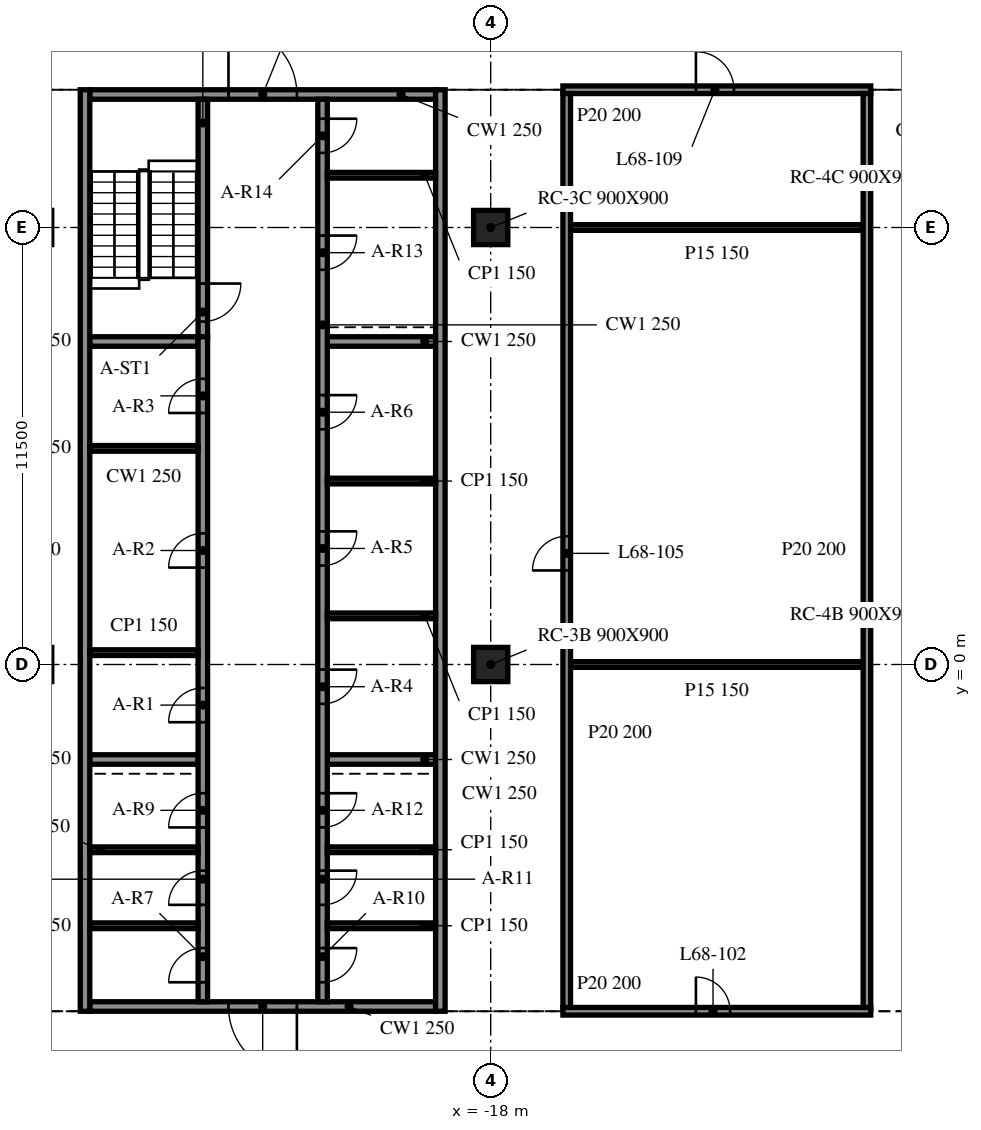
"""IFC4 building model, lengths in metres.
Left out: names, types, materials, properties, quantities, classifications, styles, units other than length and angle.
Written with IfcOpenShell. Run it as: python <this file> out.ifc"""

import sys

from ifc_helpers import new_model, si_unit, direction, frame, frame_2d, origin, origin_2d, place, context, subcontext, project, spatial, rectangle, extrude, element, fill, save


model = new_model("IFC4")
c1 = context("Model", 3, precision=1e-05, world=origin(), true_north=direction((0.0, 1.0)))
c2 = subcontext(c1, "Body", "Model", "MODEL_VIEW")
j1 = project(units=[si_unit("LENGTHUNIT", "METRE"), si_unit("PLANEANGLEUNIT", "RADIAN")], contexts=[c1])
p1 = place(None, origin())
s1 = spatial("IfcSite", under=j1, at=p1, CompositionType="ELEMENT")
p2 = place(p1, origin())
s2 = spatial("IfcBuilding", under=s1, at=p2, CompositionType="ELEMENT")
p3 = place(p2, frame((0.0, 0.0, 278.5)))
s3 = spatial("IfcBuildingStorey", under=s2, at=p3, CompositionType="ELEMENT", Elevation=278.5)
for number, where, z_axis, x_axis in (
    (1, (-18.0, 0.0, -0.34), (0.0, 0.0, 1.0), (1.0, 0.0, 0.0)),
    (2, (-18.0, 11.5, -0.34), (0.0, 0.0, 1.0), (1.0, 0.0, 0.0)),
):
    element("IfcColumn", number, at=place(p3, frame(where, z_axis=z_axis, x_axis=x_axis)), inside=s3, PredefinedType="COLUMN", context=c2, shape_type="SweptSolid", body=[
        extrude(rectangle(XDim=0.9, YDim=0.9, at=origin_2d()), origin(), (0.0, 0.0, 1.0), 3.8),
    ])
for number, where, z_axis, x_axis in (
    (3, (-28.675, 15.125, 0.0), (0.0, 0.0, 1.0), (0.0, -1.0, 0.0)),
    (4, (-19.325, -9.125, 0.0), (0.0, 0.0, 1.0), (0.0, 1.0, 0.0)),
):
    element("IfcWall", number, at=place(p3, frame(where, z_axis=z_axis, x_axis=x_axis)), inside=s3, PredefinedType="SOLIDWALL", context=c2, shape_type="SweptSolid", body=[
        extrude(rectangle(XDim=24.25, YDim=0.25, at=frame_2d((12.125, 0.0))), origin(), (0.0, 0.0, 1.0), 3.46),
    ])
p4 = place(p3, frame((-19.45, -9.0, 0.0), z_axis=(0.0, 0.0, 1.0), x_axis=(-1.0, 0.0, 0.0)))
e5 = element("IfcWall", 5, at=p4, inside=s3, PredefinedType="SOLIDWALL", context=c2, shape_type="SweptSolid", body=[
    extrude(rectangle(XDim=9.1, YDim=0.25, at=frame_2d((4.55, 0.0))), origin(), (0.0, 0.0, 1.0), 3.46),
])
p5 = place(p4, frame((3.65, 0.0, 0.0)))
e6 = element("IfcOpeningElement", 6, at=p5, cuts=e5, PredefinedType="OPENING", context=c2, shape_type="SweptSolid", body=[
    extrude(rectangle(XDim=1.8, YDim=2.1, at=frame_2d((0.9, 1.05))), frame((0.0, 0.135, 0.0), z_axis=(0.0, -1.0, 0.0), x_axis=(1.0, 0.0, 0.0)), (0.0, 0.0, 1.0), 0.27),
])
p6 = place(p3, frame((-28.55, 15.0, 0.0), z_axis=(0.0, 0.0, 1.0), x_axis=(1.0, 0.0, 0.0)))
e7 = element("IfcWall", 7, at=p6, inside=s3, PredefinedType="SOLIDWALL", context=c2, shape_type="SweptSolid", body=[
    extrude(rectangle(XDim=9.1, YDim=0.25, at=frame_2d((4.55, 0.0))), origin(), (0.0, 0.0, 1.0), 3.46),
])
p7 = place(p6, frame((3.65, 0.0, 0.0)))
e8 = element("IfcOpeningElement", 8, at=p7, cuts=e7, PredefinedType="OPENING", context=c2, shape_type="SweptSolid", body=[
    extrude(rectangle(XDim=1.8, YDim=2.1, at=frame_2d((0.9, 1.05))), frame((0.0, 0.135, 0.0), z_axis=(0.0, -1.0, 0.0), x_axis=(1.0, 0.0, 0.0)), (0.0, 0.0, 1.0), 0.27),
])
p8 = place(p3, frame((-25.575, -8.875, 0.0), z_axis=(0.0, 0.0, 1.0), x_axis=(0.0, 1.0, 0.0)))
e9 = element("IfcWall", 9, at=p8, inside=s3, PredefinedType="SOLIDWALL", context=c2, shape_type="SweptSolid", body=[
    extrude(rectangle(XDim=17.5, YDim=0.25, at=frame_2d((8.75, 0.0))), origin(), (0.0, 0.0, 1.0), 3.46),
])
p9 = place(p8, frame((7.356, 0.0, 0.0)))
e10 = element("IfcOpeningElement", 10, at=p9, cuts=e9, PredefinedType="OPENING", context=c2, shape_type="SweptSolid", body=[
    extrude(rectangle(XDim=0.9, YDim=2.1, at=frame_2d((0.45, 1.05))), frame((0.0, 0.135, 0.0), z_axis=(0.0, -1.0, 0.0), x_axis=(1.0, 0.0, 0.0)), (0.0, 0.0, 1.0), 0.27),
])
p10 = place(p8, frame((11.425, 0.0, 0.0)))
e11 = element("IfcOpeningElement", 11, at=p10, cuts=e9, PredefinedType="OPENING", context=c2, shape_type="SweptSolid", body=[
    extrude(rectangle(XDim=0.9, YDim=2.1, at=frame_2d((0.45, 1.05))), frame((0.0, 0.135, 0.0), z_axis=(0.0, -1.0, 0.0), x_axis=(1.0, 0.0, 0.0)), (0.0, 0.0, 1.0), 0.27),
])
p11 = place(p8, frame((15.494, 0.0, 0.0)))
e12 = element("IfcOpeningElement", 12, at=p11, cuts=e9, PredefinedType="OPENING", context=c2, shape_type="SweptSolid", body=[
    extrude(rectangle(XDim=0.9, YDim=2.1, at=frame_2d((0.45, 1.05))), frame((0.0, 0.135, 0.0), z_axis=(0.0, -1.0, 0.0), x_axis=(1.0, 0.0, 0.0)), (0.0, 0.0, 1.0), 0.27),
])
p12 = place(p8, frame((0.512, 0.0, 0.0)))
e13 = element("IfcOpeningElement", 13, at=p12, cuts=e9, PredefinedType="OPENING", context=c2, shape_type="SweptSolid", body=[
    extrude(rectangle(XDim=0.9, YDim=2.1, at=frame_2d((0.45, 1.05))), frame((0.0, 0.135, 0.0), z_axis=(0.0, -1.0, 0.0), x_axis=(1.0, 0.0, 0.0)), (0.0, 0.0, 1.0), 0.27),
])
p13 = place(p8, frame((2.55, 0.0, 0.0)))
e14 = element("IfcOpeningElement", 14, at=p13, cuts=e9, PredefinedType="OPENING", context=c2, shape_type="SweptSolid", body=[
    extrude(rectangle(XDim=0.9, YDim=2.1, at=frame_2d((0.45, 1.05))), frame((0.0, 0.135, 0.0), z_axis=(0.0, -1.0, 0.0), x_axis=(1.0, 0.0, 0.0)), (0.0, 0.0, 1.0), 0.27),
])
p14 = place(p8, frame((4.587, 0.0, 0.0)))
e15 = element("IfcOpeningElement", 15, at=p14, cuts=e9, PredefinedType="OPENING", context=c2, shape_type="SweptSolid", body=[
    extrude(rectangle(XDim=0.9, YDim=2.1, at=frame_2d((0.45, 1.05))), frame((0.0, 0.135, 0.0), z_axis=(0.0, -1.0, 0.0), x_axis=(1.0, 0.0, 0.0)), (0.0, 0.0, 1.0), 0.27),
])
p15 = place(p3, frame((-25.575, 14.875, 0.0), z_axis=(0.0, 0.0, 1.0), x_axis=(0.0, -1.0, 0.0)))
e16 = element("IfcWall", 16, at=p15, inside=s3, PredefinedType="SOLIDWALL", context=c2, shape_type="SweptSolid", body=[
    extrude(rectangle(XDim=6.25, YDim=0.25, at=frame_2d((3.125, 0.0))), origin(), (0.0, 0.0, 1.0), 3.46),
])
p16 = place(p15, frame((4.85, 0.0, 0.0)))
e17 = element("IfcOpeningElement", 17, at=p16, cuts=e16, PredefinedType="OPENING", context=c2, shape_type="SweptSolid", body=[
    extrude(rectangle(XDim=1.0, YDim=2.1, at=frame_2d((0.5, 1.05))), frame((0.0, 0.135, 0.0), z_axis=(0.0, -1.0, 0.0), x_axis=(1.0, 0.0, 0.0)), (0.0, 0.0, 1.0), 0.27),
])
p17 = place(p3, frame((-22.425, 14.875, 0.0), z_axis=(0.0, 0.0, 1.0), x_axis=(0.0, -1.0, 0.0)))
e18 = element("IfcWall", 18, at=p17, inside=s3, PredefinedType="SOLIDWALL", context=c2, shape_type="SweptSolid", body=[
    extrude(rectangle(XDim=23.75, YDim=0.25, at=frame_2d((11.875, 0.0))), origin(), (0.0, 0.0, 1.0), 3.46),
])
p18 = place(p17, frame((15.01, 0.0, 0.0)))
e19 = element("IfcOpeningElement", 19, at=p18, cuts=e18, PredefinedType="OPENING", context=c2, shape_type="SweptSolid", body=[
    extrude(rectangle(XDim=0.9, YDim=2.1, at=frame_2d((0.45, 1.05))), frame((0.0, 0.135, 0.0), z_axis=(0.0, -1.0, 0.0), x_axis=(1.0, 0.0, 0.0)), (0.0, 0.0, 1.0), 0.27),
])
p19 = place(p17, frame((11.371, 0.0, 0.0)))
e20 = element("IfcOpeningElement", 20, at=p19, cuts=e18, PredefinedType="OPENING", context=c2, shape_type="SweptSolid", body=[
    extrude(rectangle(XDim=0.9, YDim=2.1, at=frame_2d((0.45, 1.05))), frame((0.0, 0.135, 0.0), z_axis=(0.0, -1.0, 0.0), x_axis=(1.0, 0.0, 0.0)), (0.0, 0.0, 1.0), 0.27),
])
p20 = place(p17, frame((7.786, 0.0, 0.0)))
e21 = element("IfcOpeningElement", 21, at=p20, cuts=e18, PredefinedType="OPENING", context=c2, shape_type="SweptSolid", body=[
    extrude(rectangle(XDim=0.9, YDim=2.1, at=frame_2d((0.45, 1.05))), frame((0.0, 0.135, 0.0), z_axis=(0.0, -1.0, 0.0), x_axis=(1.0, 0.0, 0.0)), (0.0, 0.0, 1.0), 0.27),
])
p21 = place(p17, frame((22.337, 0.0, 0.0)))
e22 = element("IfcOpeningElement", 22, at=p21, cuts=e18, PredefinedType="OPENING", context=c2, shape_type="SweptSolid", body=[
    extrude(rectangle(XDim=0.9, YDim=2.1, at=frame_2d((0.45, 1.05))), frame((0.0, 0.135, 0.0), z_axis=(0.0, -1.0, 0.0), x_axis=(1.0, 0.0, 0.0)), (0.0, 0.0, 1.0), 0.27),
])
p22 = place(p17, frame((20.3, 0.0, 0.0)))
e23 = element("IfcOpeningElement", 23, at=p22, cuts=e18, PredefinedType="OPENING", context=c2, shape_type="SweptSolid", body=[
    extrude(rectangle(XDim=0.9, YDim=2.1, at=frame_2d((0.45, 1.05))), frame((0.0, 0.135, 0.0), z_axis=(0.0, -1.0, 0.0), x_axis=(1.0, 0.0, 0.0)), (0.0, 0.0, 1.0), 0.27),
])
p23 = place(p17, frame((18.262, 0.0, 0.0)))
e24 = element("IfcOpeningElement", 24, at=p23, cuts=e18, PredefinedType="OPENING", context=c2, shape_type="SweptSolid", body=[
    extrude(rectangle(XDim=0.9, YDim=2.1, at=frame_2d((0.45, 1.05))), frame((0.0, 0.135, 0.0), z_axis=(0.0, -1.0, 0.0), x_axis=(1.0, 0.0, 0.0)), (0.0, 0.0, 1.0), 0.27),
])
p24 = place(p17, frame((3.587, 0.0, 0.0)))
e25 = element("IfcOpeningElement", 25, at=p24, cuts=e18, PredefinedType="OPENING", context=c2, shape_type="SweptSolid", body=[
    extrude(rectangle(XDim=0.9, YDim=2.1, at=frame_2d((0.45, 1.05))), frame((0.0, 0.135, 0.0), z_axis=(0.0, -1.0, 0.0), x_axis=(1.0, 0.0, 0.0)), (0.0, 0.0, 1.0), 0.27),
])
p25 = place(p17, frame((0.512, 0.0, 0.0)))
e26 = element("IfcOpeningElement", 26, at=p25, cuts=e18, PredefinedType="OPENING", context=c2, shape_type="SweptSolid", body=[
    extrude(rectangle(XDim=0.9, YDim=2.1, at=frame_2d((0.45, 1.05))), frame((0.0, 0.135, 0.0), z_axis=(0.0, -1.0, 0.0), x_axis=(1.0, 0.0, 0.0)), (0.0, 0.0, 1.0), 0.27),
])
for number, where, z_axis, x_axis in (
    (27, (-28.55, -2.5, 0.0), (0.0, 0.0, 1.0), (1.0, 0.0, 0.0)),
    (28, (-28.55, 8.5, 0.0), (0.0, 0.0, 1.0), (1.0, 0.0, 0.0)),
    (29, (-22.3, -2.5, 0.0), (0.0, 0.0, 1.0), (1.0, 0.0, 0.0)),
    (30, (-22.3, 8.5, 0.0), (0.0, 0.0, 1.0), (1.0, 0.0, 0.0)),
):
    element("IfcWall", number, at=place(p3, frame(where, z_axis=z_axis, x_axis=x_axis)), inside=s3, PredefinedType="SOLIDWALL", context=c2, shape_type="SweptSolid", body=[
        extrude(rectangle(XDim=2.85, YDim=0.25, at=frame_2d((1.425, 0.0))), origin(), (0.0, 0.0, 1.0), 3.46),
    ])
for number, where, z_axis, x_axis in (
    (31, (-28.55, 0.312, 0.0), (0.0, 0.0, 1.0), (1.0, 0.0, 0.0)),
    (32, (-28.55, 5.688, 0.0), (0.0, 0.0, 1.0), (1.0, 0.0, 0.0)),
    (33, (-22.3, 1.28, 0.0), (0.0, 0.0, 1.0), (1.0, 0.0, 0.0)),
    (34, (-22.3, 4.827, 0.0), (0.0, 0.0, 1.0), (1.0, 0.0, 0.0)),
    (35, (-28.55, -6.875, 0.0), (0.0, 0.0, 1.0), (1.0, 0.0, 0.0)),
    (36, (-28.55, -4.875, 0.0), (0.0, 0.0, 1.0), (1.0, 0.0, 0.0)),
    (37, (-22.3, -6.875, 0.0), (0.0, 0.0, 1.0), (1.0, 0.0, 0.0)),
    (38, (-22.3, -4.875, 0.0), (0.0, 0.0, 1.0), (1.0, 0.0, 0.0)),
    (39, (-22.3, 12.875, 0.0), (0.0, 0.0, 1.0), (1.0, 0.0, 0.0)),
):
    element("IfcWall", number, at=place(p3, frame(where, z_axis=z_axis, x_axis=x_axis)), inside=s3, PredefinedType="PARTITIONING", context=c2, shape_type="SweptSolid", body=[
        extrude(rectangle(XDim=2.85, YDim=0.15, at=frame_2d((1.425, 0.0))), origin(), (0.0, 0.0, 1.0), 3.46),
    ])
p26 = place(p3, frame((-16.1, -9.125, 0.0), z_axis=(0.0, 0.0, 1.0), x_axis=(1.0, 0.0, 0.0)))
e40 = element("IfcWall", 40, at=p26, inside=s3, PredefinedType="PARTITIONING", context=c2, shape_type="SweptSolid", body=[
    extrude(rectangle(XDim=8.1, YDim=0.2, at=frame_2d((4.05, 0.0))), origin(), (0.0, 0.0, 1.0), 3.46),
])
p27 = place(p26, frame((3.5, 0.0, 0.0)))
e41 = element("IfcOpeningElement", 41, at=p27, cuts=e40, PredefinedType="OPENING", context=c2, shape_type="SweptSolid", body=[
    extrude(rectangle(XDim=0.9, YDim=2.1, at=frame_2d((0.45, 1.05))), frame((0.0, 0.11, 0.0), z_axis=(0.0, -1.0, 0.0), x_axis=(1.0, 0.0, 0.0)), (0.0, 0.0, 1.0), 0.22),
])
for number, where, z_axis, x_axis in (
    (42, (-15.9, 0.0, 0.0), (0.0, 0.0, 1.0), (1.0, 0.0, 0.0)),
    (43, (-15.9, 11.5, 0.0), (0.0, 0.0, 1.0), (1.0, 0.0, 0.0)),
):
    element("IfcWall", number, at=place(p3, frame(where, z_axis=z_axis, x_axis=x_axis)), inside=s3, PredefinedType="PARTITIONING", context=c2, shape_type="SweptSolid", body=[
        extrude(rectangle(XDim=7.7, YDim=0.15, at=frame_2d((3.85, 0.0))), origin(), (0.0, 0.0, 1.0), 3.46),
    ])
p28 = place(p3, frame((-16.1, 15.125, 0.0), z_axis=(0.0, 0.0, 1.0), x_axis=(1.0, 0.0, 0.0)))
e44 = element("IfcWall", 44, at=p28, inside=s3, PredefinedType="PARTITIONING", context=c2, shape_type="SweptSolid", body=[
    extrude(rectangle(XDim=8.1, YDim=0.2, at=frame_2d((4.05, 0.0))), origin(), (0.0, 0.0, 1.0), 3.46),
])
p29 = place(p28, frame((3.5, 0.0, 0.0)))
e45 = element("IfcOpeningElement", 45, at=p29, cuts=e44, PredefinedType="OPENING", context=c2, shape_type="SweptSolid", body=[
    extrude(rectangle(XDim=1.0, YDim=2.1, at=frame_2d((0.5, 1.05))), frame((0.0, 0.11, 0.0), z_axis=(0.0, -1.0, 0.0), x_axis=(1.0, 0.0, 0.0)), (0.0, 0.0, 1.0), 0.22),
])
p30 = place(p3, frame((-16.0, -9.025, 0.0), z_axis=(0.0, 0.0, 1.0), x_axis=(0.0, 1.0, 0.0)))
e46 = element("IfcWall", 46, at=p30, inside=s3, PredefinedType="PARTITIONING", context=c2, shape_type="SweptSolid", body=[
    extrude(rectangle(XDim=24.05, YDim=0.2, at=frame_2d((12.025, 0.0))), origin(), (0.0, 0.0, 1.0), 3.46),
])
p31 = place(p30, frame((11.5, 0.0, 0.0)))
e47 = element("IfcOpeningElement", 47, at=p31, cuts=e46, PredefinedType="OPENING", context=c2, shape_type="SweptSolid", body=[
    extrude(rectangle(XDim=0.9, YDim=2.1, at=frame_2d((0.45, 1.05))), frame((0.0, 0.11, 0.0), z_axis=(0.0, -1.0, 0.0), x_axis=(1.0, 0.0, 0.0)), (0.0, 0.0, 1.0), 0.22),
])
p32 = place(p3, frame((-8.1, -9.025, 0.0), z_axis=(0.0, 0.0, 1.0), x_axis=(0.0, 1.0, 0.0)))
e48 = element("IfcWall", 48, at=p32, inside=s3, PredefinedType="PARTITIONING", context=c2, shape_type="SweptSolid", body=[
    extrude(rectangle(XDim=24.05, YDim=0.2, at=frame_2d((12.025, 0.0))), origin(), (0.0, 0.0, 1.0), 3.46),
])
p33 = place(p5, origin())
e49 = element("IfcDoor", 49, at=p33, inside=s3, OperationType="DOUBLE_DOOR_SINGLE_SWING", PredefinedType="DOOR", context=c2, shape_type="SweptSolid", body=[
    extrude(rectangle(XDim=1.8, YDim=2.1, at=frame_2d((0.9, 1.05))), frame((0.0, 0.025, 0.0), z_axis=(0.0, -1.0, 0.0), x_axis=(1.0, 0.0, 0.0)), (0.0, 0.0, 1.0), 0.05),
])
fill(e6, e49)
p34 = place(p7, origin())
e50 = element("IfcDoor", 50, at=p34, inside=s3, OperationType="DOUBLE_DOOR_SINGLE_SWING", PredefinedType="DOOR", context=c2, shape_type="SweptSolid", body=[
    extrude(rectangle(XDim=1.8, YDim=2.1, at=frame_2d((0.9, 1.05))), frame((0.0, 0.025, 0.0), z_axis=(0.0, -1.0, 0.0), x_axis=(1.0, 0.0, 0.0)), (0.0, 0.0, 1.0), 0.05),
])
fill(e8, e50)
p35 = place(p9, origin())
e51 = element("IfcDoor", 51, at=p35, inside=s3, OperationType="SINGLE_SWING_LEFT", PredefinedType="DOOR", context=c2, shape_type="SweptSolid", body=[
    extrude(rectangle(XDim=0.9, YDim=2.1, at=frame_2d((0.45, 1.05))), frame((0.0, 0.025, 0.0), z_axis=(0.0, -1.0, 0.0), x_axis=(1.0, 0.0, 0.0)), (0.0, 0.0, 1.0), 0.05),
])
fill(e10, e51)
p36 = place(p10, origin())
e52 = element("IfcDoor", 52, at=p36, inside=s3, OperationType="SINGLE_SWING_RIGHT", PredefinedType="DOOR", context=c2, shape_type="SweptSolid", body=[
    extrude(rectangle(XDim=0.9, YDim=2.1, at=frame_2d((0.45, 1.05))), frame((0.0, 0.025, 0.0), z_axis=(0.0, -1.0, 0.0), x_axis=(1.0, 0.0, 0.0)), (0.0, 0.0, 1.0), 0.05),
])
fill(e11, e52)
p37 = place(p11, origin())
e53 = element("IfcDoor", 53, at=p37, inside=s3, OperationType="SINGLE_SWING_LEFT", PredefinedType="DOOR", context=c2, shape_type="SweptSolid", body=[
    extrude(rectangle(XDim=0.9, YDim=2.1, at=frame_2d((0.45, 1.05))), frame((0.0, 0.025, 0.0), z_axis=(0.0, -1.0, 0.0), x_axis=(1.0, 0.0, 0.0)), (0.0, 0.0, 1.0), 0.05),
])
fill(e12, e53)
p38 = place(p18, origin())
e54 = element("IfcDoor", 54, at=p38, inside=s3, OperationType="SINGLE_SWING_RIGHT", PredefinedType="DOOR", context=c2, shape_type="SweptSolid", body=[
    extrude(rectangle(XDim=0.9, YDim=2.1, at=frame_2d((0.45, 1.05))), frame((0.0, 0.025, 0.0), z_axis=(0.0, -1.0, 0.0), x_axis=(1.0, 0.0, 0.0)), (0.0, 0.0, 1.0), 0.05),
])
fill(e19, e54)
p39 = place(p19, origin())
e55 = element("IfcDoor", 55, at=p39, inside=s3, OperationType="SINGLE_SWING_LEFT", PredefinedType="DOOR", context=c2, shape_type="SweptSolid", body=[
    extrude(rectangle(XDim=0.9, YDim=2.1, at=frame_2d((0.45, 1.05))), frame((0.0, 0.025, 0.0), z_axis=(0.0, -1.0, 0.0), x_axis=(1.0, 0.0, 0.0)), (0.0, 0.0, 1.0), 0.05),
])
fill(e20, e55)
p40 = place(p20, origin())
e56 = element("IfcDoor", 56, at=p40, inside=s3, OperationType="SINGLE_SWING_RIGHT", PredefinedType="DOOR", context=c2, shape_type="SweptSolid", body=[
    extrude(rectangle(XDim=0.9, YDim=2.1, at=frame_2d((0.45, 1.05))), frame((0.0, 0.025, 0.0), z_axis=(0.0, -1.0, 0.0), x_axis=(1.0, 0.0, 0.0)), (0.0, 0.0, 1.0), 0.05),
])
fill(e21, e56)
p41 = place(p12, origin())
e57 = element("IfcDoor", 57, at=p41, inside=s3, OperationType="SINGLE_SWING_LEFT", PredefinedType="DOOR", context=c2, shape_type="SweptSolid", body=[
    extrude(rectangle(XDim=0.9, YDim=2.1, at=frame_2d((0.45, 1.05))), frame((0.0, 0.025, 0.0), z_axis=(0.0, -1.0, 0.0), x_axis=(1.0, 0.0, 0.0)), (0.0, 0.0, 1.0), 0.05),
])
fill(e13, e57)
p42 = place(p13, origin())
e58 = element("IfcDoor", 58, at=p42, inside=s3, OperationType="SINGLE_SWING_RIGHT", PredefinedType="DOOR", context=c2, shape_type="SweptSolid", body=[
    extrude(rectangle(XDim=0.9, YDim=2.1, at=frame_2d((0.45, 1.05))), frame((0.0, 0.025, 0.0), z_axis=(0.0, -1.0, 0.0), x_axis=(1.0, 0.0, 0.0)), (0.0, 0.0, 1.0), 0.05),
])
fill(e14, e58)
p43 = place(p14, origin())
e59 = element("IfcDoor", 59, at=p43, inside=s3, OperationType="SINGLE_SWING_LEFT", PredefinedType="DOOR", context=c2, shape_type="SweptSolid", body=[
    extrude(rectangle(XDim=0.9, YDim=2.1, at=frame_2d((0.45, 1.05))), frame((0.0, 0.025, 0.0), z_axis=(0.0, -1.0, 0.0), x_axis=(1.0, 0.0, 0.0)), (0.0, 0.0, 1.0), 0.05),
])
fill(e15, e59)
p44 = place(p21, origin())
e60 = element("IfcDoor", 60, at=p44, inside=s3, OperationType="SINGLE_SWING_RIGHT", PredefinedType="DOOR", context=c2, shape_type="SweptSolid", body=[
    extrude(rectangle(XDim=0.9, YDim=2.1, at=frame_2d((0.45, 1.05))), frame((0.0, 0.025, 0.0), z_axis=(0.0, -1.0, 0.0), x_axis=(1.0, 0.0, 0.0)), (0.0, 0.0, 1.0), 0.05),
])
fill(e22, e60)
p45 = place(p22, origin())
e61 = element("IfcDoor", 61, at=p45, inside=s3, OperationType="SINGLE_SWING_LEFT", PredefinedType="DOOR", context=c2, shape_type="SweptSolid", body=[
    extrude(rectangle(XDim=0.9, YDim=2.1, at=frame_2d((0.45, 1.05))), frame((0.0, 0.025, 0.0), z_axis=(0.0, -1.0, 0.0), x_axis=(1.0, 0.0, 0.0)), (0.0, 0.0, 1.0), 0.05),
])
fill(e23, e61)
p46 = place(p23, origin())
e62 = element("IfcDoor", 62, at=p46, inside=s3, OperationType="SINGLE_SWING_RIGHT", PredefinedType="DOOR", context=c2, shape_type="SweptSolid", body=[
    extrude(rectangle(XDim=0.9, YDim=2.1, at=frame_2d((0.45, 1.05))), frame((0.0, 0.025, 0.0), z_axis=(0.0, -1.0, 0.0), x_axis=(1.0, 0.0, 0.0)), (0.0, 0.0, 1.0), 0.05),
])
fill(e24, e62)
p47 = place(p24, origin())
e63 = element("IfcDoor", 63, at=p47, inside=s3, OperationType="SINGLE_SWING_LEFT", PredefinedType="DOOR", context=c2, shape_type="SweptSolid", body=[
    extrude(rectangle(XDim=0.9, YDim=2.1, at=frame_2d((0.45, 1.05))), frame((0.0, 0.025, 0.0), z_axis=(0.0, -1.0, 0.0), x_axis=(1.0, 0.0, 0.0)), (0.0, 0.0, 1.0), 0.05),
])
fill(e25, e63)
p48 = place(p25, origin())
e64 = element("IfcDoor", 64, at=p48, inside=s3, OperationType="SINGLE_SWING_RIGHT", PredefinedType="DOOR", context=c2, shape_type="SweptSolid", body=[
    extrude(rectangle(XDim=0.9, YDim=2.1, at=frame_2d((0.45, 1.05))), frame((0.0, 0.025, 0.0), z_axis=(0.0, -1.0, 0.0), x_axis=(1.0, 0.0, 0.0)), (0.0, 0.0, 1.0), 0.05),
])
fill(e26, e64)
p49 = place(p16, origin())
e65 = element("IfcDoor", 65, at=p49, inside=s3, OperationType="SINGLE_SWING_LEFT", PredefinedType="DOOR", context=c2, shape_type="SweptSolid", body=[
    extrude(rectangle(XDim=1.0, YDim=2.1, at=frame_2d((0.5, 1.05))), frame((0.0, 0.025, 0.0), z_axis=(0.0, -1.0, 0.0), x_axis=(1.0, 0.0, 0.0)), (0.0, 0.0, 1.0), 0.05),
])
fill(e17, e65)
p50 = place(p27, origin())
e66 = element("IfcDoor", 66, at=p50, inside=s3, OperationType="SINGLE_SWING_LEFT", PredefinedType="DOOR", context=c2, shape_type="SweptSolid", body=[
    extrude(rectangle(XDim=0.9, YDim=2.1, at=frame_2d((0.45, 1.05))), frame((0.0, 0.025, 0.0), z_axis=(0.0, -1.0, 0.0), x_axis=(1.0, 0.0, 0.0)), (0.0, 0.0, 1.0), 0.05),
])
fill(e41, e66)
p51 = place(p31, origin())
e67 = element("IfcDoor", 67, at=p51, inside=s3, OperationType="SINGLE_SWING_RIGHT", PredefinedType="DOOR", context=c2, shape_type="SweptSolid", body=[
    extrude(rectangle(XDim=0.9, YDim=2.1, at=frame_2d((0.45, 1.05))), frame((0.0, 0.025, 0.0), z_axis=(0.0, -1.0, 0.0), x_axis=(1.0, 0.0, 0.0)), (0.0, 0.0, 1.0), 0.05),
])
fill(e47, e67)
p52 = place(p29, origin())
e68 = element("IfcDoor", 68, at=p52, inside=s3, OperationType="SINGLE_SWING_RIGHT", PredefinedType="DOOR", context=c2, shape_type="SweptSolid", body=[
    extrude(rectangle(XDim=1.0, YDim=2.1, at=frame_2d((0.5, 1.05))), frame((0.0, 0.025, 0.0), z_axis=(0.0, -1.0, 0.0), x_axis=(1.0, 0.0, 0.0)), (0.0, 0.0, 1.0), 0.05),
])
fill(e45, e68)
save(model, sys.argv[1])
